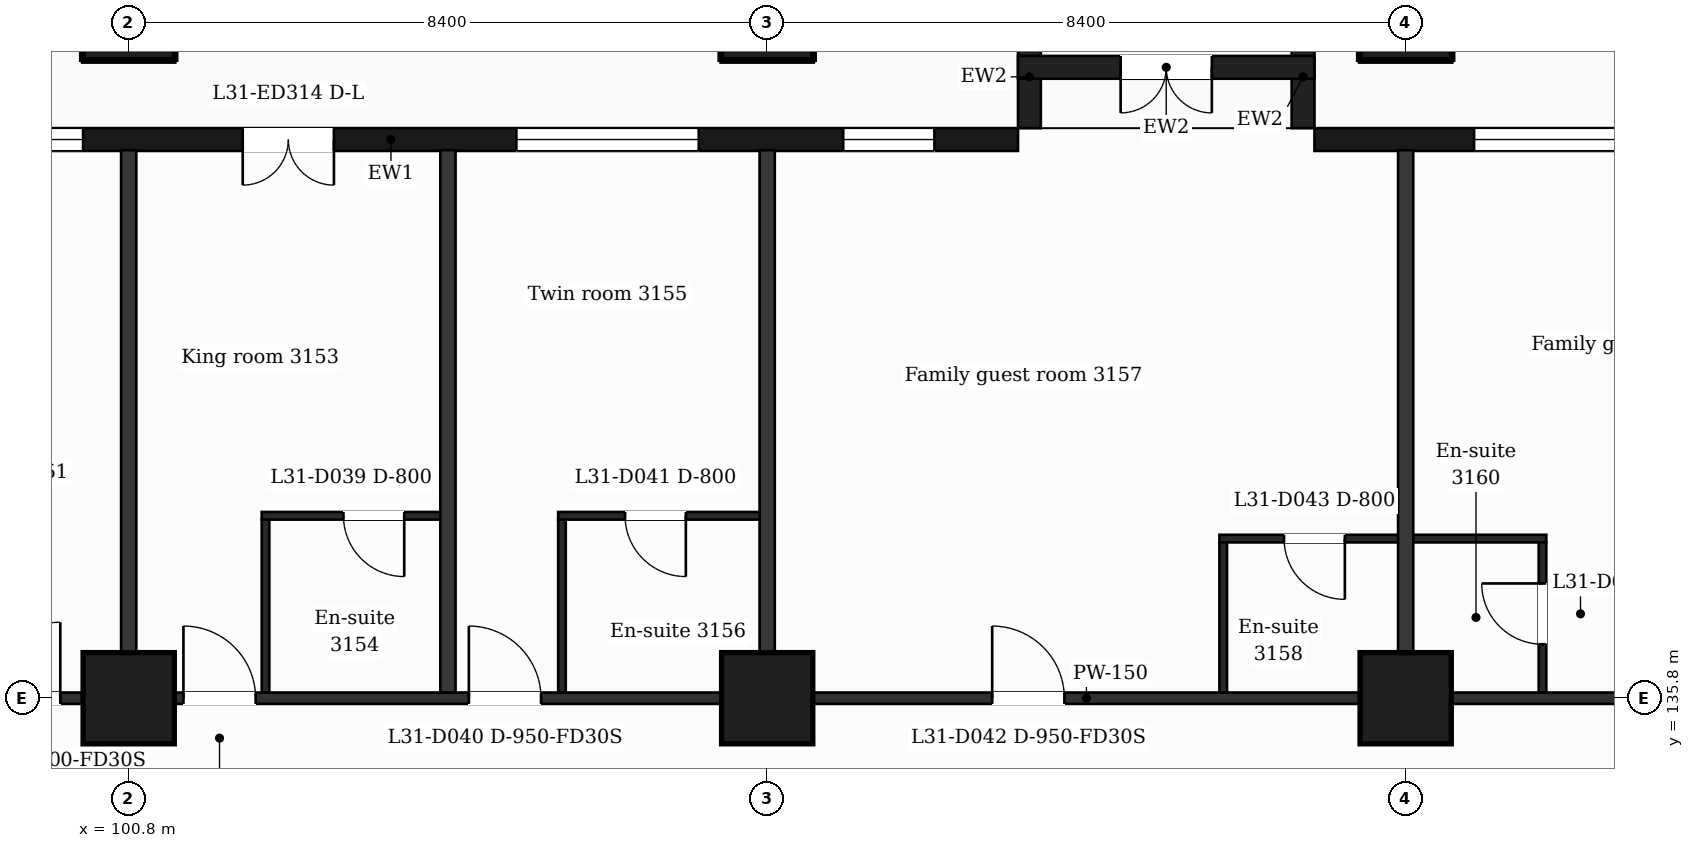
"""IFC4 building model, lengths in metres.
Left out: names, types, materials, properties, quantities, classifications, styles, units other than length and angle.
Written with IfcOpenShell. Run it as: python <this file> out.ifc"""

import sys

from ifc_helpers import new_model, si_unit, direction, frame, frame_2d, origin, origin_2d, place, context, subcontext, project, spatial, rectangle, extrude, element, fill, save


model = new_model("IFC4")
c1 = context("Model", 3, precision=1e-05, world=origin(), true_north=direction((0.0, 1.0)))
c2 = subcontext(c1, "Body", "Model", "MODEL_VIEW")
j1 = project(units=[si_unit("LENGTHUNIT", "METRE"), si_unit("PLANEANGLEUNIT", "RADIAN")], contexts=[c1])
p1 = place(None, origin())
s1 = spatial("IfcSite", under=j1, at=p1, CompositionType="ELEMENT")
p2 = place(p1, origin())
s2 = spatial("IfcBuilding", under=s1, at=p2, CompositionType="ELEMENT")
p3 = place(p2, frame((0.0, 0.0, 131.7)))
s3 = spatial("IfcBuildingStorey", under=s2, at=p3, CompositionType="ELEMENT", Elevation=131.7)
for number, where, z_axis, x_axis in (
    (1, (100.8, 135.8, 0.0), (0.0, 0.0, 1.0), (1.0, 0.0, 0.0)),
    (2, (109.2, 135.8, 0.0), (0.0, 0.0, 1.0), (1.0, 0.0, 0.0)),
    (3, (117.6, 135.8, 0.0), (0.0, 0.0, 1.0), (1.0, 0.0, 0.0)),
    (4, (100.8, 144.8, 0.0), (0.0, 0.0, 1.0), (1.0, 0.0, 0.0)),
    (5, (109.2, 144.8, 0.0), (0.0, 0.0, 1.0), (1.0, 0.0, 0.0)),
    (6, (117.6, 144.8, 0.0), (0.0, 0.0, 1.0), (1.0, 0.0, 0.0)),
):
    element("IfcColumn", number, at=place(p3, frame(where, z_axis=z_axis, x_axis=x_axis)), inside=s3, PredefinedType="COLUMN", context=c2, shape_type="SweptSolid", body=[
        extrude(rectangle(XDim=1.2, YDim=1.2, at=origin_2d()), origin(), (0.0, 0.0, 1.0), 3.7),
    ])
p4 = place(p3, frame((130.65, 143.15, 0.0), z_axis=(0.0, 0.0, 1.0), x_axis=(-1.0, 0.0, 0.0)))
e7 = element("IfcWall", 7, at=p4, inside=s3, PredefinedType="SOLIDWALL", context=c2, shape_type="SweptSolid", body=[
    extrude(rectangle(XDim=14.25, YDim=0.3, at=frame_2d((7.125, 0.0))), origin(), (0.0, 0.0, 1.0), 3.2),
])
p5 = place(p4, frame((1.35, 0.0, 0.9)))
e8 = element("IfcOpeningElement", 8, at=p5, cuts=e7, PredefinedType="OPENING", context=c2, shape_type="SweptSolid", body=[
    extrude(rectangle(XDim=2.4, YDim=2.1, at=frame_2d((1.2, 1.05))), frame((0.0, 0.16, 0.0), z_axis=(0.0, -1.0, 0.0), x_axis=(1.0, 0.0, 0.0)), (0.0, 0.0, 1.0), 0.32),
])
p6 = place(p4, frame((6.15, 0.0, 0.0)))
e9 = element("IfcOpeningElement", 9, at=p6, cuts=e7, PredefinedType="OPENING", context=c2, shape_type="SweptSolid", body=[
    extrude(rectangle(XDim=1.2, YDim=2.4, at=frame_2d((0.6, 1.2))), frame((0.0, 0.16, 0.0), z_axis=(0.0, -1.0, 0.0), x_axis=(1.0, 0.0, 0.0)), (0.0, 0.0, 1.0), 0.32),
])
p7 = place(p4, frame((9.75, 0.0, 0.9)))
e10 = element("IfcOpeningElement", 10, at=p7, cuts=e7, PredefinedType="OPENING", context=c2, shape_type="SweptSolid", body=[
    extrude(rectangle(XDim=2.4, YDim=2.1, at=frame_2d((1.2, 1.05))), frame((0.0, 0.16, 0.0), z_axis=(0.0, -1.0, 0.0), x_axis=(1.0, 0.0, 0.0)), (0.0, 0.0, 1.0), 0.32),
])
p8 = place(p3, frame((112.5, 143.15, 0.0), z_axis=(0.0, 0.0, 1.0), x_axis=(-1.0, 0.0, 0.0)))
e11 = element("IfcWall", 11, at=p8, inside=s3, PredefinedType="SOLIDWALL", context=c2, shape_type="SweptSolid", body=[
    extrude(rectangle(XDim=16.5, YDim=0.3, at=frame_2d((8.25, 0.0))), origin(), (0.0, 0.0, 1.0), 3.2),
])
p9 = place(p8, frame((1.1, 0.0, 0.9)))
e12 = element("IfcOpeningElement", 12, at=p9, cuts=e11, PredefinedType="OPENING", context=c2, shape_type="SweptSolid", body=[
    extrude(rectangle(XDim=1.2, YDim=2.1, at=frame_2d((0.6, 1.05))), frame((0.0, 0.16, 0.0), z_axis=(0.0, -1.0, 0.0), x_axis=(1.0, 0.0, 0.0)), (0.0, 0.0, 1.0), 0.32),
])
p10 = place(p8, frame((4.2, 0.0, 0.9)))
e13 = element("IfcOpeningElement", 13, at=p10, cuts=e11, PredefinedType="OPENING", context=c2, shape_type="SweptSolid", body=[
    extrude(rectangle(XDim=2.4, YDim=2.1, at=frame_2d((1.2, 1.05))), frame((0.0, 0.16, 0.0), z_axis=(0.0, -1.0, 0.0), x_axis=(1.0, 0.0, 0.0)), (0.0, 0.0, 1.0), 0.32),
])
p11 = place(p8, frame((9.0, 0.0, 0.0)))
e14 = element("IfcOpeningElement", 14, at=p11, cuts=e11, PredefinedType="OPENING", context=c2, shape_type="SweptSolid", body=[
    extrude(rectangle(XDim=1.2, YDim=2.4, at=frame_2d((0.6, 1.2))), frame((0.0, 0.16, 0.0), z_axis=(0.0, -1.0, 0.0), x_axis=(1.0, 0.0, 0.0)), (0.0, 0.0, 1.0), 0.32),
])
p12 = place(p8, frame((12.3, 0.0, 0.9)))
e15 = element("IfcOpeningElement", 15, at=p12, cuts=e11, PredefinedType="OPENING", context=c2, shape_type="SweptSolid", body=[
    extrude(rectangle(XDim=1.2, YDim=2.1, at=frame_2d((0.6, 1.05))), frame((0.0, 0.16, 0.0), z_axis=(0.0, -1.0, 0.0), x_axis=(1.0, 0.0, 0.0)), (0.0, 0.0, 1.0), 0.32),
])
p13 = place(p8, frame((14.1, 0.0, 0.9)))
e16 = element("IfcOpeningElement", 16, at=p13, cuts=e11, PredefinedType="OPENING", context=c2, shape_type="SweptSolid", body=[
    extrude(rectangle(XDim=1.2, YDim=2.1, at=frame_2d((0.6, 1.05))), frame((0.0, 0.16, 0.0), z_axis=(0.0, -1.0, 0.0), x_axis=(1.0, 0.0, 0.0)), (0.0, 0.0, 1.0), 0.32),
])
for number, where, z_axis, x_axis in (
    (17, (116.25, 143.3, 0.0), (0.0, 0.0, 1.0), (0.0, 1.0, 0.0)),
    (18, (112.65, 143.3, 0.0), (0.0, 0.0, 1.0), (0.0, 1.0, 0.0)),
):
    element("IfcWall", number, at=place(p3, frame(where, z_axis=z_axis, x_axis=x_axis)), inside=s3, PredefinedType="SOLIDWALL", context=c2, shape_type="SweptSolid", body=[
        extrude(rectangle(XDim=1.35, YDim=0.3, at=frame_2d((0.675, 0.0))), origin(), (0.0, 0.0, 1.0), 3.2),
    ])
p14 = place(p3, frame((116.4, 144.1, 0.0), z_axis=(0.0, 0.0, 1.0), x_axis=(-1.0, 0.0, 0.0)))
e19 = element("IfcWall", 19, at=p14, inside=s3, PredefinedType="SOLIDWALL", context=c2, shape_type="SweptSolid", body=[
    extrude(rectangle(XDim=3.9, YDim=0.3, at=frame_2d((1.95, 0.0))), origin(), (0.0, 0.0, 1.0), 3.2),
])
p15 = place(p14, frame((1.35, 0.0, 0.0)))
e20 = element("IfcOpeningElement", 20, at=p15, cuts=e19, PredefinedType="OPENING", context=c2, shape_type="SweptSolid", body=[
    extrude(rectangle(XDim=1.2, YDim=2.4, at=frame_2d((0.6, 1.2))), frame((0.0, 0.16, 0.0), z_axis=(0.0, -1.0, 0.0), x_axis=(1.0, 0.0, 0.0)), (0.0, 0.0, 1.0), 0.32),
])
p16 = place(p3, frame((90.895, 135.8, 0.0), z_axis=(0.0, 0.0, 1.0), x_axis=(1.0, 0.0, 0.0)))
e21 = element("IfcWall", 21, at=p16, inside=s3, PredefinedType="PARTITIONING", context=c2, shape_type="SweptSolid", body=[
    extrude(rectangle(XDim=45.011, YDim=0.15, at=frame_2d((22.505, 0.0))), origin(), (0.0, 0.0, 1.0), 3.2),
])
p17 = place(p16, frame((8.005, 0.0, 0.0)))
e22 = element("IfcOpeningElement", 22, at=p17, cuts=e21, PredefinedType="OPENING", context=c2, shape_type="SweptSolid", body=[
    extrude(rectangle(XDim=1.0, YDim=2.1, at=frame_2d((0.5, 1.05))), frame((0.0, 0.085, 0.0), z_axis=(0.0, -1.0, 0.0), x_axis=(1.0, 0.0, 0.0)), (0.0, 0.0, 1.0), 0.17),
])
p18 = place(p16, frame((10.625, 0.0, 0.0)))
e23 = element("IfcOpeningElement", 23, at=p18, cuts=e21, PredefinedType="OPENING", context=c2, shape_type="SweptSolid", body=[
    extrude(rectangle(XDim=0.95, YDim=2.1, at=frame_2d((0.475, 1.05))), frame((0.0, 0.085, 0.0), z_axis=(0.0, -1.0, 0.0), x_axis=(1.0, 0.0, 0.0)), (0.0, 0.0, 1.0), 0.17),
])
p19 = place(p16, frame((14.38, 0.0, 0.0)))
e24 = element("IfcOpeningElement", 24, at=p19, cuts=e21, PredefinedType="OPENING", context=c2, shape_type="SweptSolid", body=[
    extrude(rectangle(XDim=0.95, YDim=2.1, at=frame_2d((0.475, 1.05))), frame((0.0, 0.085, 0.0), z_axis=(0.0, -1.0, 0.0), x_axis=(1.0, 0.0, 0.0)), (0.0, 0.0, 1.0), 0.17),
])
p20 = place(p16, frame((21.265, 0.0, 0.0)))
e25 = element("IfcOpeningElement", 25, at=p20, cuts=e21, PredefinedType="OPENING", context=c2, shape_type="SweptSolid", body=[
    extrude(rectangle(XDim=0.95, YDim=2.1, at=frame_2d((0.475, 1.05))), frame((0.0, 0.085, 0.0), z_axis=(0.0, -1.0, 0.0), x_axis=(1.0, 0.0, 0.0)), (0.0, 0.0, 1.0), 0.17),
])
p21 = place(p16, frame((30.835, 0.0, 0.0)))
e26 = element("IfcOpeningElement", 26, at=p21, cuts=e21, PredefinedType="OPENING", context=c2, shape_type="SweptSolid", body=[
    extrude(rectangle(XDim=0.95, YDim=2.1, at=frame_2d((0.475, 1.05))), frame((0.0, 0.085, 0.0), z_axis=(0.0, -1.0, 0.0), x_axis=(1.0, 0.0, 0.0)), (0.0, 0.0, 1.0), 0.17),
])
p22 = place(p16, frame((36.555, 0.0, 0.0)))
e27 = element("IfcOpeningElement", 27, at=p22, cuts=e21, PredefinedType="OPENING", context=c2, shape_type="SweptSolid", body=[
    extrude(rectangle(XDim=1.0, YDim=2.1, at=frame_2d((0.5, 1.05))), frame((0.0, 0.085, 0.0), z_axis=(0.0, -1.0, 0.0), x_axis=(1.0, 0.0, 0.0)), (0.0, 0.0, 1.0), 0.17),
])
p23 = place(p3, frame((115.15, 137.9, 0.0), z_axis=(0.0, 0.0, 1.0), x_axis=(1.0, 0.0, 0.0)))
e28 = element("IfcWall", 28, at=p23, inside=s3, PredefinedType="PARTITIONING", context=c2, shape_type="SweptSolid", body=[
    extrude(rectangle(XDim=4.3, YDim=0.1, at=frame_2d((2.15, 0.0))), origin(), (0.0, 0.0, 1.0), 3.2),
])
p24 = place(p23, frame((0.85, 0.0, 0.0)))
e29 = element("IfcOpeningElement", 29, at=p24, cuts=e28, PredefinedType="OPENING", context=c2, shape_type="SweptSolid", body=[
    extrude(rectangle(XDim=0.8, YDim=2.1, at=frame_2d((0.4, 1.05))), frame((0.0, 0.06, 0.0), z_axis=(0.0, -1.0, 0.0), x_axis=(1.0, 0.0, 0.0)), (0.0, 0.0, 1.0), 0.12),
])
p25 = place(p3, frame((102.55, 138.2, 0.0), z_axis=(0.0, 0.0, 1.0), x_axis=(1.0, 0.0, 0.0)))
e30 = element("IfcWall", 30, at=p25, inside=s3, PredefinedType="PARTITIONING", context=c2, shape_type="SweptSolid", body=[
    extrude(rectangle(XDim=2.45, YDim=0.1, at=frame_2d((1.225, 0.0))), origin(), (0.0, 0.0, 1.0), 3.2),
])
p26 = place(p25, frame((1.075, 0.0, 0.0)))
e31 = element("IfcOpeningElement", 31, at=p26, cuts=e30, PredefinedType="OPENING", context=c2, shape_type="SweptSolid", body=[
    extrude(rectangle(XDim=0.8, YDim=2.1, at=frame_2d((0.4, 1.05))), frame((0.0, 0.06, 0.0), z_axis=(0.0, -1.0, 0.0), x_axis=(1.0, 0.0, 0.0)), (0.0, 0.0, 1.0), 0.12),
])
p27 = place(p3, frame((106.45, 138.2, 0.0), z_axis=(0.0, 0.0, 1.0), x_axis=(1.0, 0.0, 0.0)))
e32 = element("IfcWall", 32, at=p27, inside=s3, PredefinedType="PARTITIONING", context=c2, shape_type="SweptSolid", body=[
    extrude(rectangle(XDim=2.75, YDim=0.1, at=frame_2d((1.375, 0.0))), origin(), (0.0, 0.0, 1.0), 3.2),
])
p28 = place(p27, frame((0.88, 0.0, 0.0)))
e33 = element("IfcOpeningElement", 33, at=p28, cuts=e32, PredefinedType="OPENING", context=c2, shape_type="SweptSolid", body=[
    extrude(rectangle(XDim=0.8, YDim=2.1, at=frame_2d((0.4, 1.05))), frame((0.0, 0.06, 0.0), z_axis=(0.0, -1.0, 0.0), x_axis=(1.0, 0.0, 0.0)), (0.0, 0.0, 1.0), 0.12),
])
p29 = place(p3, frame((100.8, 135.875, 0.0), z_axis=(0.0, 0.0, 1.0), x_axis=(0.0, 1.0, 0.0)))
e34 = element("IfcWall", 34, at=p29, inside=s3, PredefinedType="PARTITIONING", context=c2, shape_type="SweptSolid", body=[
    extrude(rectangle(XDim=7.135, YDim=0.2, at=frame_2d((3.567, 0.0))), origin(), (0.0, 0.0, 1.0), 3.2),
])
p30 = place(p3, frame((102.6, 135.875, 0.0), z_axis=(0.0, 0.0, 1.0), x_axis=(0.0, 1.0, 0.0)))
e35 = element("IfcWall", 35, at=p30, inside=s3, PredefinedType="PARTITIONING", context=c2, shape_type="SweptSolid", body=[
    extrude(rectangle(XDim=2.275, YDim=0.1, at=frame_2d((1.137, 0.0))), origin(), (0.0, 0.0, 1.0), 3.2),
])
p31 = place(p3, frame((105.0, 135.875, 0.0), z_axis=(0.0, 0.0, 1.0), x_axis=(0.0, 1.0, 0.0)))
e36 = element("IfcWall", 36, at=p31, inside=s3, PredefinedType="PARTITIONING", context=c2, shape_type="SweptSolid", body=[
    extrude(rectangle(XDim=7.135, YDim=0.2, at=frame_2d((3.567, 0.0))), origin(), (0.0, 0.0, 1.0), 3.2),
])
p32 = place(p3, frame((106.5, 135.875, 0.0), z_axis=(0.0, 0.0, 1.0), x_axis=(0.0, 1.0, 0.0)))
e37 = element("IfcWall", 37, at=p32, inside=s3, PredefinedType="PARTITIONING", context=c2, shape_type="SweptSolid", body=[
    extrude(rectangle(XDim=2.275, YDim=0.1, at=frame_2d((1.137, 0.0))), origin(), (0.0, 0.0, 1.0), 3.2),
])
p33 = place(p3, frame((109.2, 135.875, 0.0), z_axis=(0.0, 0.0, 1.0), x_axis=(0.0, 1.0, 0.0)))
e38 = element("IfcWall", 38, at=p33, inside=s3, PredefinedType="PARTITIONING", context=c2, shape_type="SweptSolid", body=[
    extrude(rectangle(XDim=7.135, YDim=0.2, at=frame_2d((3.567, 0.0))), origin(), (0.0, 0.0, 1.0), 3.2),
])
p34 = place(p3, frame((115.2, 135.875, 0.0), z_axis=(0.0, 0.0, 1.0), x_axis=(0.0, 1.0, 0.0)))
e39 = element("IfcWall", 39, at=p34, inside=s3, PredefinedType="PARTITIONING", context=c2, shape_type="SweptSolid", body=[
    extrude(rectangle(XDim=1.975, YDim=0.1, at=frame_2d((0.988, 0.0))), origin(), (0.0, 0.0, 1.0), 3.2),
])
p35 = place(p3, frame((117.6, 135.875, 0.0), z_axis=(0.0, 0.0, 1.0), x_axis=(0.0, 1.0, 0.0)))
e40 = element("IfcWall", 40, at=p35, inside=s3, PredefinedType="PARTITIONING", context=c2, shape_type="SweptSolid", body=[
    extrude(rectangle(XDim=7.135, YDim=0.2, at=frame_2d((3.567, 0.0))), origin(), (0.0, 0.0, 1.0), 3.2),
])
p36 = place(p3, frame((119.4, 135.875, 0.0), z_axis=(0.0, 0.0, 1.0), x_axis=(0.0, 1.0, 0.0)))
e41 = element("IfcWall", 41, at=p36, inside=s3, PredefinedType="PARTITIONING", context=c2, shape_type="SweptSolid", body=[
    extrude(rectangle(XDim=1.975, YDim=0.1, at=frame_2d((0.988, 0.0))), origin(), (0.0, 0.0, 1.0), 3.2),
])
p37 = place(p36, frame((0.635, 0.0, 0.0)))
e42 = element("IfcOpeningElement", 42, at=p37, cuts=e41, PredefinedType="OPENING", context=c2, shape_type="SweptSolid", body=[
    extrude(rectangle(XDim=0.8, YDim=2.1, at=frame_2d((0.4, 1.05))), frame((0.0, 0.06, 0.0), z_axis=(0.0, -1.0, 0.0), x_axis=(1.0, 0.0, 0.0)), (0.0, 0.0, 1.0), 0.12),
])
p38 = place(p7, origin())
e43 = element("IfcWindow", 43, at=p38, inside=s3, PartitioningType="SINGLE_PANEL", PredefinedType="WINDOW", context=c2, shape_type="SweptSolid", body=[
    extrude(rectangle(XDim=2.4, YDim=2.1, at=frame_2d((1.2, 1.05))), frame((0.0, 0.03, 0.0), z_axis=(0.0, -1.0, 0.0), x_axis=(1.0, 0.0, 0.0)), (0.0, 0.0, 1.0), 0.06),
])
fill(e10, e43)
p39 = place(p9, origin())
e44 = element("IfcWindow", 44, at=p39, inside=s3, PartitioningType="SINGLE_PANEL", PredefinedType="WINDOW", context=c2, shape_type="SweptSolid", body=[
    extrude(rectangle(XDim=1.2, YDim=2.1, at=frame_2d((0.6, 1.05))), frame((0.0, 0.03, 0.0), z_axis=(0.0, -1.0, 0.0), x_axis=(1.0, 0.0, 0.0)), (0.0, 0.0, 1.0), 0.06),
])
fill(e12, e44)
p40 = place(p10, origin())
e45 = element("IfcWindow", 45, at=p40, inside=s3, PartitioningType="SINGLE_PANEL", PredefinedType="WINDOW", context=c2, shape_type="SweptSolid", body=[
    extrude(rectangle(XDim=2.4, YDim=2.1, at=frame_2d((1.2, 1.05))), frame((0.0, 0.03, 0.0), z_axis=(0.0, -1.0, 0.0), x_axis=(1.0, 0.0, 0.0)), (0.0, 0.0, 1.0), 0.06),
])
fill(e13, e45)
p41 = place(p11, origin())
e46 = element("IfcDoor", 46, at=p41, inside=s3, OperationType="DOUBLE_DOOR_SINGLE_SWING", PredefinedType="DOOR", context=c2, shape_type="SweptSolid", body=[
    extrude(rectangle(XDim=1.2, YDim=2.4, at=frame_2d((0.6, 1.2))), frame((0.0, 0.025, 0.0), z_axis=(0.0, -1.0, 0.0), x_axis=(1.0, 0.0, 0.0)), (0.0, 0.0, 1.0), 0.05),
])
fill(e14, e46)
p42 = place(p12, origin())
e47 = element("IfcWindow", 47, at=p42, inside=s3, PartitioningType="SINGLE_PANEL", PredefinedType="WINDOW", context=c2, shape_type="SweptSolid", body=[
    extrude(rectangle(XDim=1.2, YDim=2.1, at=frame_2d((0.6, 1.05))), frame((0.0, 0.03, 0.0), z_axis=(0.0, -1.0, 0.0), x_axis=(1.0, 0.0, 0.0)), (0.0, 0.0, 1.0), 0.06),
])
fill(e15, e47)
p43 = place(p15, origin())
e48 = element("IfcDoor", 48, at=p43, inside=s3, OperationType="DOUBLE_DOOR_SINGLE_SWING", PredefinedType="DOOR", context=c2, shape_type="SweptSolid", body=[
    extrude(rectangle(XDim=1.2, YDim=2.4, at=frame_2d((0.6, 1.2))), frame((0.0, 0.025, 0.0), z_axis=(0.0, -1.0, 0.0), x_axis=(1.0, 0.0, 0.0)), (0.0, 0.0, 1.0), 0.05),
])
fill(e20, e48)
p44 = place(p17, origin())
e49 = element("IfcDoor", 49, at=p44, inside=s3, OperationType="SINGLE_SWING_RIGHT", PredefinedType="DOOR", context=c2, shape_type="SweptSolid", body=[
    extrude(rectangle(XDim=1.0, YDim=2.1, at=frame_2d((0.5, 1.05))), frame((0.0, 0.025, 0.0), z_axis=(0.0, -1.0, 0.0), x_axis=(1.0, 0.0, 0.0)), (0.0, 0.0, 1.0), 0.05),
])
fill(e22, e49)
p45 = place(p18, origin())
e50 = element("IfcDoor", 50, at=p45, inside=s3, OperationType="SINGLE_SWING_LEFT", PredefinedType="DOOR", context=c2, shape_type="SweptSolid", body=[
    extrude(rectangle(XDim=0.95, YDim=2.1, at=frame_2d((0.475, 1.05))), frame((0.0, 0.025, 0.0), z_axis=(0.0, -1.0, 0.0), x_axis=(1.0, 0.0, 0.0)), (0.0, 0.0, 1.0), 0.05),
])
fill(e23, e50)
p46 = place(p26, origin())
e51 = element("IfcDoor", 51, at=p46, inside=s3, OperationType="SINGLE_SWING_RIGHT", PredefinedType="DOOR", context=c2, shape_type="SweptSolid", body=[
    extrude(rectangle(XDim=0.8, YDim=2.1, at=frame_2d((0.4, 1.05))), frame((0.0, 0.025, 0.0), z_axis=(0.0, -1.0, 0.0), x_axis=(1.0, 0.0, 0.0)), (0.0, 0.0, 1.0), 0.05),
])
fill(e31, e51)
p47 = place(p19, origin())
e52 = element("IfcDoor", 52, at=p47, inside=s3, OperationType="SINGLE_SWING_LEFT", PredefinedType="DOOR", context=c2, shape_type="SweptSolid", body=[
    extrude(rectangle(XDim=0.95, YDim=2.1, at=frame_2d((0.475, 1.05))), frame((0.0, 0.025, 0.0), z_axis=(0.0, -1.0, 0.0), x_axis=(1.0, 0.0, 0.0)), (0.0, 0.0, 1.0), 0.05),
])
fill(e24, e52)
p48 = place(p28, origin())
e53 = element("IfcDoor", 53, at=p48, inside=s3, OperationType="SINGLE_SWING_RIGHT", PredefinedType="DOOR", context=c2, shape_type="SweptSolid", body=[
    extrude(rectangle(XDim=0.8, YDim=2.1, at=frame_2d((0.4, 1.05))), frame((0.0, 0.025, 0.0), z_axis=(0.0, -1.0, 0.0), x_axis=(1.0, 0.0, 0.0)), (0.0, 0.0, 1.0), 0.05),
])
fill(e33, e53)
p49 = place(p20, origin())
e54 = element("IfcDoor", 54, at=p49, inside=s3, OperationType="SINGLE_SWING_LEFT", PredefinedType="DOOR", context=c2, shape_type="SweptSolid", body=[
    extrude(rectangle(XDim=0.95, YDim=2.1, at=frame_2d((0.475, 1.05))), frame((0.0, 0.025, 0.0), z_axis=(0.0, -1.0, 0.0), x_axis=(1.0, 0.0, 0.0)), (0.0, 0.0, 1.0), 0.05),
])
fill(e25, e54)
p50 = place(p24, origin())
e55 = element("IfcDoor", 55, at=p50, inside=s3, OperationType="SINGLE_SWING_RIGHT", PredefinedType="DOOR", context=c2, shape_type="SweptSolid", body=[
    extrude(rectangle(XDim=0.8, YDim=2.1, at=frame_2d((0.4, 1.05))), frame((0.0, 0.025, 0.0), z_axis=(0.0, -1.0, 0.0), x_axis=(1.0, 0.0, 0.0)), (0.0, 0.0, 1.0), 0.05),
])
fill(e29, e55)
p51 = place(p37, origin())
e56 = element("IfcDoor", 56, at=p51, inside=s3, OperationType="SINGLE_SWING_RIGHT", PredefinedType="DOOR", context=c2, shape_type="SweptSolid", body=[
    extrude(rectangle(XDim=0.8, YDim=2.1, at=frame_2d((0.4, 1.05))), frame((0.0, 0.025, 0.0), z_axis=(0.0, -1.0, 0.0), x_axis=(1.0, 0.0, 0.0)), (0.0, 0.0, 1.0), 0.05),
])
fill(e42, e56)
save(model, sys.argv[1])
